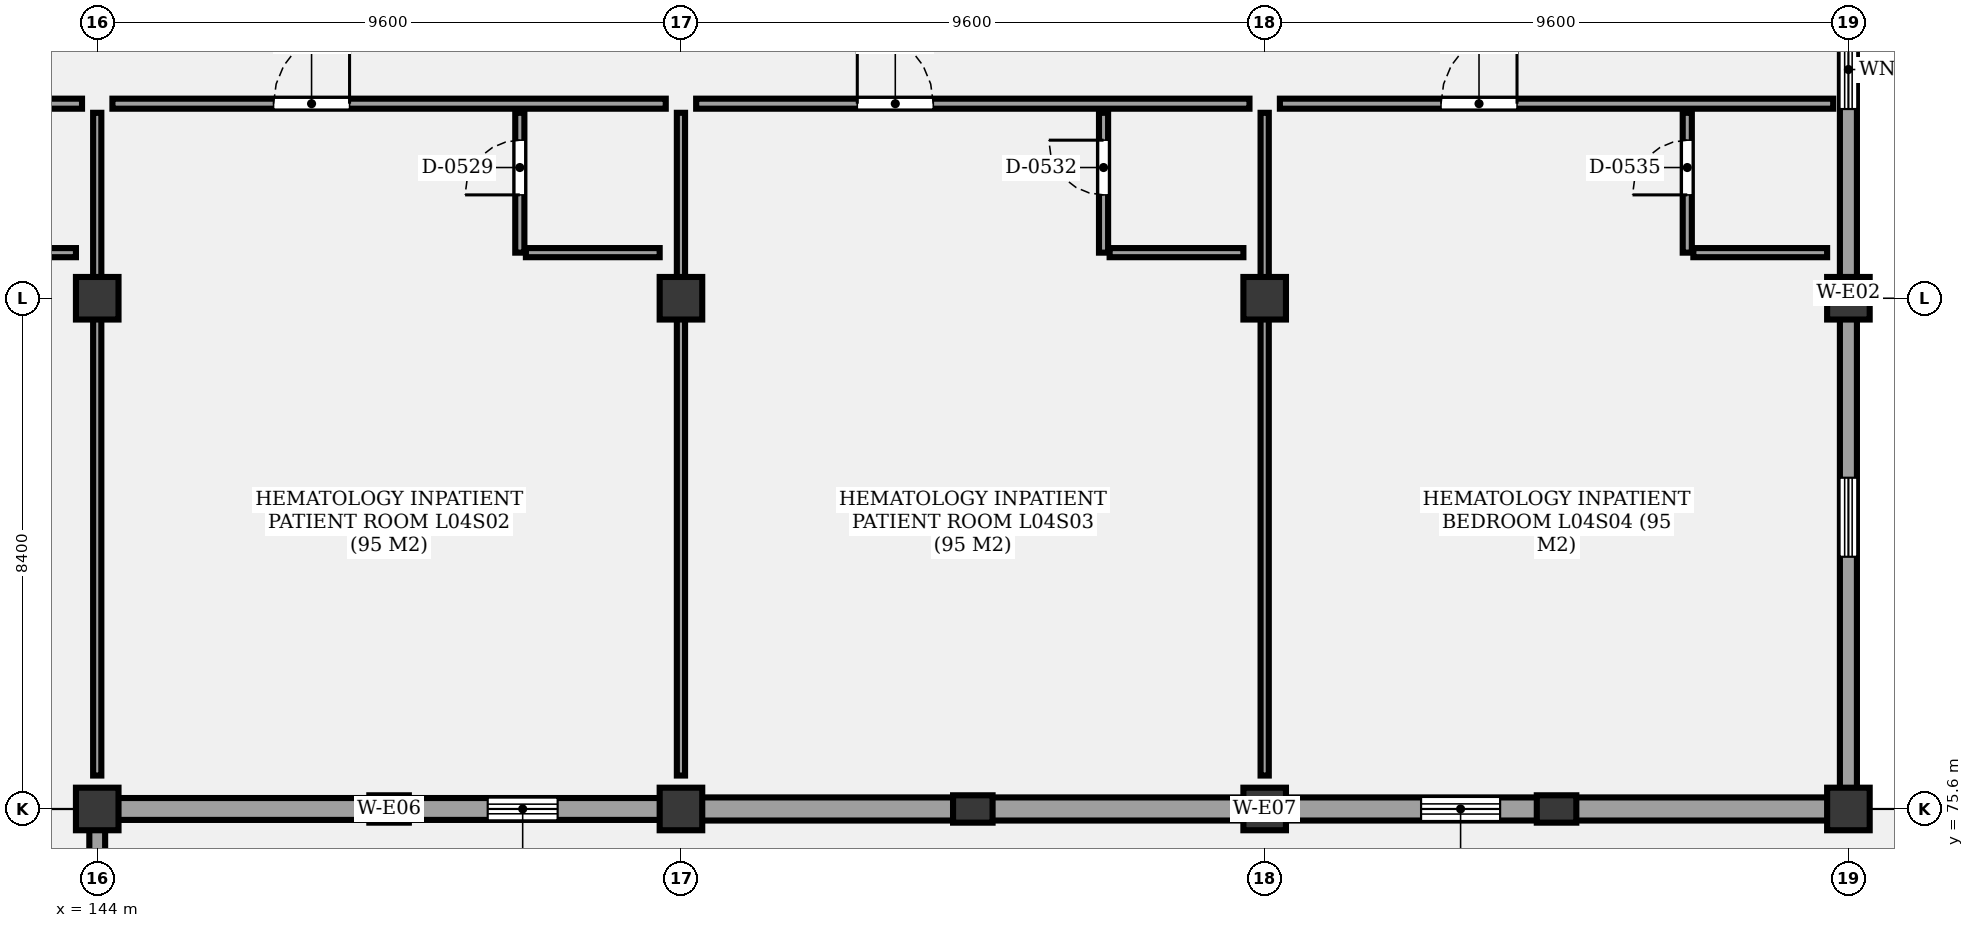
"""IFC4 building model, lengths in metres.
Left out: names, types, materials, properties, quantities, classifications, styles, units other than length and angle.
Written with IfcOpenShell. Run it as: python <this file> out.ifc"""

import sys

from ifc_helpers import new_model, si_unit, direction, frame, frame_2d, origin, origin_2d, place, context, subcontext, project, spatial, rectangle, extrude, element, fill, save


model = new_model("IFC4")
c1 = context("Model", 3, precision=1e-05, world=origin(), true_north=direction((0.0, 1.0)))
c2 = subcontext(c1, "Body", "Model", "MODEL_VIEW")
j1 = project(units=[si_unit("LENGTHUNIT", "METRE"), si_unit("PLANEANGLEUNIT", "RADIAN")], contexts=[c1])
p1 = place(None, origin())
s1 = spatial("IfcSite", under=j1, at=p1, CompositionType="ELEMENT")
p2 = place(p1, origin())
s2 = spatial("IfcBuilding", under=s1, at=p2, CompositionType="ELEMENT")
p3 = place(p2, frame((0.0, 0.0, 17.8)))
s3 = spatial("IfcBuildingStorey", under=s2, at=p3, CompositionType="ELEMENT", Elevation=17.8)
for number, where, z_axis, x_axis in (
    (1, (144.0, 75.6, 0.0), (0.0, 0.0, 1.0), (1.0, 0.0, 0.0)),
    (2, (144.0, 84.0, 0.0), (0.0, 0.0, 1.0), (1.0, 0.0, 0.0)),
    (3, (153.6, 75.6, 0.0), (0.0, 0.0, 1.0), (1.0, 0.0, 0.0)),
    (4, (153.6, 84.0, 0.0), (0.0, 0.0, 1.0), (1.0, 0.0, 0.0)),
    (5, (163.2, 75.6, 0.0), (0.0, 0.0, 1.0), (1.0, 0.0, 0.0)),
    (6, (163.2, 84.0, 0.0), (0.0, 0.0, 1.0), (1.0, 0.0, 0.0)),
    (7, (172.8, 75.6, 0.0), (0.0, 0.0, 1.0), (1.0, 0.0, 0.0)),
    (8, (172.8, 84.0, 0.0), (0.0, 0.0, 1.0), (1.0, 0.0, 0.0)),
):
    element("IfcColumn", number, at=place(p3, frame(where, z_axis=z_axis, x_axis=x_axis)), inside=s3, PredefinedType="COLUMN", context=c2, shape_type="SweptSolid", body=[
        extrude(rectangle(XDim=0.7, YDim=0.7, at=origin_2d()), origin(), (0.0, 0.0, 1.0), 4.2),
    ])
for number, where, z_axis, x_axis in (
    (9, (148.8, 75.6, 0.0), (0.0, 0.0, 1.0), (1.0, 0.0, 0.0)),
    (10, (158.4, 75.6, 0.0), (0.0, 0.0, 1.0), (1.0, 0.0, 0.0)),
    (11, (168.0, 75.6, 0.0), (0.0, 0.0, 1.0), (1.0, 0.0, 0.0)),
):
    element("IfcColumn", number, at=place(p3, frame(where, z_axis=z_axis, x_axis=x_axis)), inside=s3, PredefinedType="PILASTER", context=c2, shape_type="SweptSolid", body=[
        extrude(rectangle(XDim=0.65, YDim=0.45, at=origin_2d()), origin(), (0.0, 0.0, 1.0), 4.2),
    ])
p4 = place(p3, frame((153.6, 75.6, 0.0), z_axis=(0.0, 0.0, 1.0), x_axis=(-1.0, 0.0, 0.0)))
e12 = element("IfcWall", 12, at=p4, inside=s3, PredefinedType="SOLIDWALL", context=c2, shape_type="SweptSolid", body=[
    extrude(rectangle(XDim=9.6, YDim=0.36, at=frame_2d((4.8, 0.0))), origin(), (0.0, 0.0, 1.0), 3.39),
])
p5 = place(p4, frame((2.028, 0.0, 0.85)))
e13 = element("IfcOpeningElement", 13, at=p5, cuts=e12, PredefinedType="OPENING", context=c2, shape_type="SweptSolid", body=[
    extrude(rectangle(XDim=1.15, YDim=1.6, at=frame_2d((0.575, 0.8))), frame((0.0, 0.19, 0.0), z_axis=(0.0, -1.0, 0.0), x_axis=(1.0, 0.0, 0.0)), (0.0, 0.0, 1.0), 0.38),
])
p6 = place(p3, frame((172.8, 75.6, 0.0), z_axis=(0.0, 0.0, 1.0), x_axis=(-1.0, 0.0, 0.0)))
e14 = element("IfcWall", 14, at=p6, inside=s3, PredefinedType="SOLIDWALL", context=c2, shape_type="SweptSolid", body=[
    extrude(rectangle(XDim=19.2, YDim=0.38, at=frame_2d((9.6, 0.0))), origin(), (0.0, 0.0, 1.0), 3.39),
])
p7 = place(p6, frame((5.728, 0.0, 0.85)))
e15 = element("IfcOpeningElement", 15, at=p7, cuts=e14, PredefinedType="OPENING", context=c2, shape_type="SweptSolid", body=[
    extrude(rectangle(XDim=1.3, YDim=1.6, at=frame_2d((0.65, 0.8))), frame((0.0, 0.2, 0.0), z_axis=(0.0, -1.0, 0.0), x_axis=(1.0, 0.0, 0.0)), (0.0, 0.0, 1.0), 0.4),
])
p8 = place(p3, frame((144.0, 75.44, 0.0), z_axis=(0.0, 0.0, 1.0), x_axis=(0.0, -1.0, 0.0)))
e16 = element("IfcWall", 16, at=p8, inside=s3, PredefinedType="SOLIDWALL", context=c2, shape_type="SweptSolid", body=[
    extrude(rectangle(XDim=8.24, YDim=0.26, at=frame_2d((4.12, 0.0))), origin(), (0.0, 0.0, 1.0), 3.39),
])
p9 = place(p8, frame((2.82, 0.0, 0.85)))
e17 = element("IfcOpeningElement", 17, at=p9, cuts=e16, PredefinedType="OPENING", context=c2, shape_type="SweptSolid", body=[
    extrude(rectangle(XDim=2.6, YDim=1.4, at=frame_2d((1.3, 0.7))), frame((0.0, 0.14, 0.0), z_axis=(0.0, -1.0, 0.0), x_axis=(1.0, 0.0, 0.0)), (0.0, 0.0, 1.0), 0.28),
])
p10 = place(p3, frame((172.8, 92.4, 0.0), z_axis=(0.0, 0.0, 1.0), x_axis=(0.0, -1.0, 0.0)))
e18 = element("IfcWall", 18, at=p10, inside=s3, PredefinedType="SOLIDWALL", context=c2, shape_type="SweptSolid", body=[
    extrude(rectangle(XDim=16.64, YDim=0.28, at=frame_2d((8.32, 0.0))), origin(), (0.0, 0.0, 1.0), 3.39),
])
p11 = place(p10, frame((3.988, 0.0, 0.85)))
e19 = element("IfcOpeningElement", 19, at=p11, cuts=e18, PredefinedType="OPENING", context=c2, shape_type="SweptSolid", body=[
    extrude(rectangle(XDim=1.3, YDim=1.4, at=frame_2d((0.65, 0.7))), frame((0.0, 0.15, 0.0), z_axis=(0.0, -1.0, 0.0), x_axis=(1.0, 0.0, 0.0)), (0.0, 0.0, 1.0), 0.3),
])
p12 = place(p10, frame((11.352, 0.0, 0.85)))
e20 = element("IfcOpeningElement", 20, at=p12, cuts=e18, PredefinedType="OPENING", context=c2, shape_type="SweptSolid", body=[
    extrude(rectangle(XDim=1.3, YDim=1.4, at=frame_2d((0.65, 0.7))), frame((0.0, 0.15, 0.0), z_axis=(0.0, -1.0, 0.0), x_axis=(1.0, 0.0, 0.0)), (0.0, 0.0, 1.0), 0.3),
])
p13 = place(p3, frame((134.65, 87.2, 0.0), z_axis=(0.0, 0.0, 1.0), x_axis=(1.0, 0.0, 0.0)))
e21 = element("IfcWall", 21, at=p13, inside=s3, PredefinedType="PARTITIONING", context=c2, shape_type="SweptSolid", body=[
    extrude(rectangle(XDim=9.1, YDim=0.165, at=frame_2d((4.55, 0.0))), origin(), (0.0, 0.0, 1.0), 3.3),
])
p14 = place(p13, frame((2.65, 0.0, 0.0)))
e22 = element("IfcOpeningElement", 22, at=p14, cuts=e21, PredefinedType="OPENING", context=c2, shape_type="SweptSolid", body=[
    extrude(rectangle(XDim=1.25, YDim=2.2, at=frame_2d((0.625, 1.1))), frame((0.0, 0.093, 0.0), z_axis=(0.0, -1.0, 0.0), x_axis=(1.0, 0.0, 0.0)), (0.0, 0.0, 1.0), 0.185),
])
p15 = place(p3, frame((141.45, 84.75, 0.0), z_axis=(0.0, 0.0, 1.0), x_axis=(1.0, 0.0, 0.0)))
e23 = element("IfcWall", 23, at=p15, inside=s3, PredefinedType="PARTITIONING", context=c2, shape_type="SweptSolid", body=[
    extrude(rectangle(XDim=2.2, YDim=0.15, at=frame_2d((1.1, 0.0))), origin(), (0.0, 0.0, 1.0), 3.3),
])
p16 = place(p3, frame((144.25, 87.2, 0.0), z_axis=(0.0, 0.0, 1.0), x_axis=(1.0, 0.0, 0.0)))
e24 = element("IfcWall", 24, at=p16, inside=s3, PredefinedType="PARTITIONING", context=c2, shape_type="SweptSolid", body=[
    extrude(rectangle(XDim=9.1, YDim=0.165, at=frame_2d((4.55, 0.0))), origin(), (0.0, 0.0, 1.0), 3.3),
])
p17 = place(p16, frame((2.65, 0.0, 0.0)))
e25 = element("IfcOpeningElement", 25, at=p17, cuts=e24, PredefinedType="OPENING", context=c2, shape_type="SweptSolid", body=[
    extrude(rectangle(XDim=1.25, YDim=2.2, at=frame_2d((0.625, 1.1))), frame((0.0, 0.093, 0.0), z_axis=(0.0, -1.0, 0.0), x_axis=(1.0, 0.0, 0.0)), (0.0, 0.0, 1.0), 0.185),
])
p18 = place(p3, frame((150.95, 84.75, 0.0), z_axis=(0.0, 0.0, 1.0), x_axis=(0.0, 1.0, 0.0)))
e26 = element("IfcWall", 26, at=p18, inside=s3, PredefinedType="PARTITIONING", context=c2, shape_type="SweptSolid", body=[
    extrude(rectangle(XDim=2.3, YDim=0.15, at=frame_2d((1.15, 0.0))), origin(), (0.0, 0.0, 1.0), 3.3),
])
p19 = place(p18, frame((0.95, 0.0, 0.0)))
e27 = element("IfcOpeningElement", 27, at=p19, cuts=e26, PredefinedType="OPENING", context=c2, shape_type="SweptSolid", body=[
    extrude(rectangle(XDim=0.9, YDim=2.1, at=frame_2d((0.45, 1.05))), frame((0.0, 0.085, 0.0), z_axis=(0.0, -1.0, 0.0), x_axis=(1.0, 0.0, 0.0)), (0.0, 0.0, 1.0), 0.17),
])
p20 = place(p3, frame((151.05, 84.75, 0.0), z_axis=(0.0, 0.0, 1.0), x_axis=(1.0, 0.0, 0.0)))
e28 = element("IfcWall", 28, at=p20, inside=s3, PredefinedType="PARTITIONING", context=c2, shape_type="SweptSolid", body=[
    extrude(rectangle(XDim=2.2, YDim=0.15, at=frame_2d((1.1, 0.0))), origin(), (0.0, 0.0, 1.0), 3.3),
])
p21 = place(p3, frame((144.0, 76.15, 0.0), z_axis=(0.0, 0.0, 1.0), x_axis=(0.0, 1.0, 0.0)))
e29 = element("IfcWall", 29, at=p21, inside=s3, PredefinedType="PARTITIONING", context=c2, shape_type="SweptSolid", body=[
    extrude(rectangle(XDim=10.9, YDim=0.135, at=frame_2d((5.45, 0.0))), origin(), (0.0, 0.0, 1.0), 3.3),
])
p22 = place(p3, frame((153.85, 87.2, 0.0), z_axis=(0.0, 0.0, 1.0), x_axis=(1.0, 0.0, 0.0)))
e30 = element("IfcWall", 30, at=p22, inside=s3, PredefinedType="PARTITIONING", context=c2, shape_type="SweptSolid", body=[
    extrude(rectangle(XDim=9.1, YDim=0.165, at=frame_2d((4.55, 0.0))), origin(), (0.0, 0.0, 1.0), 3.3),
])
p23 = place(p22, frame((2.65, 0.0, 0.0)))
e31 = element("IfcOpeningElement", 31, at=p23, cuts=e30, PredefinedType="OPENING", context=c2, shape_type="SweptSolid", body=[
    extrude(rectangle(XDim=1.25, YDim=2.2, at=frame_2d((0.625, 1.1))), frame((0.0, 0.093, 0.0), z_axis=(0.0, -1.0, 0.0), x_axis=(1.0, 0.0, 0.0)), (0.0, 0.0, 1.0), 0.185),
])
p24 = place(p3, frame((160.55, 84.75, 0.0), z_axis=(0.0, 0.0, 1.0), x_axis=(0.0, 1.0, 0.0)))
e32 = element("IfcWall", 32, at=p24, inside=s3, PredefinedType="PARTITIONING", context=c2, shape_type="SweptSolid", body=[
    extrude(rectangle(XDim=2.3, YDim=0.15, at=frame_2d((1.15, 0.0))), origin(), (0.0, 0.0, 1.0), 3.3),
])
p25 = place(p24, frame((0.95, 0.0, 0.0)))
e33 = element("IfcOpeningElement", 33, at=p25, cuts=e32, PredefinedType="OPENING", context=c2, shape_type="SweptSolid", body=[
    extrude(rectangle(XDim=0.9, YDim=2.1, at=frame_2d((0.45, 1.05))), frame((0.0, 0.085, 0.0), z_axis=(0.0, -1.0, 0.0), x_axis=(1.0, 0.0, 0.0)), (0.0, 0.0, 1.0), 0.17),
])
p26 = place(p3, frame((160.65, 84.75, 0.0), z_axis=(0.0, 0.0, 1.0), x_axis=(1.0, 0.0, 0.0)))
e34 = element("IfcWall", 34, at=p26, inside=s3, PredefinedType="PARTITIONING", context=c2, shape_type="SweptSolid", body=[
    extrude(rectangle(XDim=2.2, YDim=0.15, at=frame_2d((1.1, 0.0))), origin(), (0.0, 0.0, 1.0), 3.3),
])
p27 = place(p3, frame((153.6, 76.15, 0.0), z_axis=(0.0, 0.0, 1.0), x_axis=(0.0, 1.0, 0.0)))
e35 = element("IfcWall", 35, at=p27, inside=s3, PredefinedType="PARTITIONING", context=c2, shape_type="SweptSolid", body=[
    extrude(rectangle(XDim=10.9, YDim=0.135, at=frame_2d((5.45, 0.0))), origin(), (0.0, 0.0, 1.0), 3.3),
])
p28 = place(p3, frame((163.45, 87.2, 0.0), z_axis=(0.0, 0.0, 1.0), x_axis=(1.0, 0.0, 0.0)))
e36 = element("IfcWall", 36, at=p28, inside=s3, PredefinedType="PARTITIONING", context=c2, shape_type="SweptSolid", body=[
    extrude(rectangle(XDim=9.1, YDim=0.165, at=frame_2d((4.55, 0.0))), origin(), (0.0, 0.0, 1.0), 3.3),
])
p29 = place(p28, frame((2.65, 0.0, 0.0)))
e37 = element("IfcOpeningElement", 37, at=p29, cuts=e36, PredefinedType="OPENING", context=c2, shape_type="SweptSolid", body=[
    extrude(rectangle(XDim=1.25, YDim=2.2, at=frame_2d((0.625, 1.1))), frame((0.0, 0.093, 0.0), z_axis=(0.0, -1.0, 0.0), x_axis=(1.0, 0.0, 0.0)), (0.0, 0.0, 1.0), 0.185),
])
p30 = place(p3, frame((170.15, 84.75, 0.0), z_axis=(0.0, 0.0, 1.0), x_axis=(0.0, 1.0, 0.0)))
e38 = element("IfcWall", 38, at=p30, inside=s3, PredefinedType="PARTITIONING", context=c2, shape_type="SweptSolid", body=[
    extrude(rectangle(XDim=2.3, YDim=0.15, at=frame_2d((1.15, 0.0))), origin(), (0.0, 0.0, 1.0), 3.3),
])
p31 = place(p30, frame((0.95, 0.0, 0.0)))
e39 = element("IfcOpeningElement", 39, at=p31, cuts=e38, PredefinedType="OPENING", context=c2, shape_type="SweptSolid", body=[
    extrude(rectangle(XDim=0.9, YDim=2.1, at=frame_2d((0.45, 1.05))), frame((0.0, 0.085, 0.0), z_axis=(0.0, -1.0, 0.0), x_axis=(1.0, 0.0, 0.0)), (0.0, 0.0, 1.0), 0.17),
])
p32 = place(p3, frame((170.25, 84.75, 0.0), z_axis=(0.0, 0.0, 1.0), x_axis=(1.0, 0.0, 0.0)))
e40 = element("IfcWall", 40, at=p32, inside=s3, PredefinedType="PARTITIONING", context=c2, shape_type="SweptSolid", body=[
    extrude(rectangle(XDim=2.2, YDim=0.15, at=frame_2d((1.1, 0.0))), origin(), (0.0, 0.0, 1.0), 3.3),
])
p33 = place(p3, frame((163.2, 76.15, 0.0), z_axis=(0.0, 0.0, 1.0), x_axis=(0.0, 1.0, 0.0)))
e41 = element("IfcWall", 41, at=p33, inside=s3, PredefinedType="PARTITIONING", context=c2, shape_type="SweptSolid", body=[
    extrude(rectangle(XDim=10.9, YDim=0.135, at=frame_2d((5.45, 0.0))), origin(), (0.0, 0.0, 1.0), 3.3),
])
p34 = place(p5, origin())
e42 = element("IfcWindow", 42, at=p34, inside=s3, PartitioningType="SINGLE_PANEL", PredefinedType="WINDOW", context=c2, shape_type="SweptSolid", body=[
    extrude(rectangle(XDim=1.15, YDim=1.6, at=frame_2d((0.575, 0.8))), frame((0.0, 0.03, 0.0), z_axis=(0.0, -1.0, 0.0), x_axis=(1.0, 0.0, 0.0)), (0.0, 0.0, 1.0), 0.06),
])
fill(e13, e42)
p35 = place(p7, origin())
e43 = element("IfcWindow", 43, at=p35, inside=s3, PartitioningType="SINGLE_PANEL", PredefinedType="WINDOW", context=c2, shape_type="SweptSolid", body=[
    extrude(rectangle(XDim=1.3, YDim=1.6, at=frame_2d((0.65, 0.8))), frame((0.0, 0.03, 0.0), z_axis=(0.0, -1.0, 0.0), x_axis=(1.0, 0.0, 0.0)), (0.0, 0.0, 1.0), 0.06),
])
fill(e15, e43)
p36 = place(p11, origin())
e44 = element("IfcWindow", 44, at=p36, inside=s3, PartitioningType="SINGLE_PANEL", PredefinedType="WINDOW", context=c2, shape_type="SweptSolid", body=[
    extrude(rectangle(XDim=1.3, YDim=1.4, at=frame_2d((0.65, 0.7))), frame((0.0, 0.03, 0.0), z_axis=(0.0, -1.0, 0.0), x_axis=(1.0, 0.0, 0.0)), (0.0, 0.0, 1.0), 0.06),
])
fill(e19, e44)
p37 = place(p12, origin())
e45 = element("IfcWindow", 45, at=p37, inside=s3, PartitioningType="SINGLE_PANEL", PredefinedType="WINDOW", context=c2, shape_type="SweptSolid", body=[
    extrude(rectangle(XDim=1.3, YDim=1.4, at=frame_2d((0.65, 0.7))), frame((0.0, 0.03, 0.0), z_axis=(0.0, -1.0, 0.0), x_axis=(1.0, 0.0, 0.0)), (0.0, 0.0, 1.0), 0.06),
])
fill(e20, e45)
p38 = place(p17, origin())
e46 = element("IfcDoor", 46, at=p38, inside=s3, OperationType="SINGLE_SWING_RIGHT", PredefinedType="DOOR", context=c2, shape_type="SweptSolid", body=[
    extrude(rectangle(XDim=1.25, YDim=2.2, at=frame_2d((0.625, 1.1))), frame((0.0, 0.025, 0.0), z_axis=(0.0, -1.0, 0.0), x_axis=(1.0, 0.0, 0.0)), (0.0, 0.0, 1.0), 0.05),
])
fill(e25, e46)
p39 = place(p19, origin())
e47 = element("IfcDoor", 47, at=p39, inside=s3, OperationType="SINGLE_SWING_LEFT", PredefinedType="DOOR", context=c2, shape_type="SweptSolid", body=[
    extrude(rectangle(XDim=0.9, YDim=2.1, at=frame_2d((0.45, 1.05))), frame((0.0, 0.025, 0.0), z_axis=(0.0, -1.0, 0.0), x_axis=(1.0, 0.0, 0.0)), (0.0, 0.0, 1.0), 0.05),
])
fill(e27, e47)
p40 = place(p23, origin())
e48 = element("IfcDoor", 48, at=p40, inside=s3, OperationType="SINGLE_SWING_LEFT", PredefinedType="DOOR", context=c2, shape_type="SweptSolid", body=[
    extrude(rectangle(XDim=1.25, YDim=2.2, at=frame_2d((0.625, 1.1))), frame((0.0, 0.025, 0.0), z_axis=(0.0, -1.0, 0.0), x_axis=(1.0, 0.0, 0.0)), (0.0, 0.0, 1.0), 0.05),
])
fill(e31, e48)
p41 = place(p25, origin())
e49 = element("IfcDoor", 49, at=p41, inside=s3, OperationType="SINGLE_SWING_RIGHT", PredefinedType="DOOR", context=c2, shape_type="SweptSolid", body=[
    extrude(rectangle(XDim=0.9, YDim=2.1, at=frame_2d((0.45, 1.05))), frame((0.0, 0.025, 0.0), z_axis=(0.0, -1.0, 0.0), x_axis=(1.0, 0.0, 0.0)), (0.0, 0.0, 1.0), 0.05),
])
fill(e33, e49)
p42 = place(p29, origin())
e50 = element("IfcDoor", 50, at=p42, inside=s3, OperationType="SINGLE_SWING_RIGHT", PredefinedType="DOOR", context=c2, shape_type="SweptSolid", body=[
    extrude(rectangle(XDim=1.25, YDim=2.2, at=frame_2d((0.625, 1.1))), frame((0.0, 0.025, 0.0), z_axis=(0.0, -1.0, 0.0), x_axis=(1.0, 0.0, 0.0)), (0.0, 0.0, 1.0), 0.05),
])
fill(e37, e50)
p43 = place(p31, origin())
e51 = element("IfcDoor", 51, at=p43, inside=s3, OperationType="SINGLE_SWING_LEFT", PredefinedType="DOOR", context=c2, shape_type="SweptSolid", body=[
    extrude(rectangle(XDim=0.9, YDim=2.1, at=frame_2d((0.45, 1.05))), frame((0.0, 0.025, 0.0), z_axis=(0.0, -1.0, 0.0), x_axis=(1.0, 0.0, 0.0)), (0.0, 0.0, 1.0), 0.05),
])
fill(e39, e51)
save(model, sys.argv[1])
